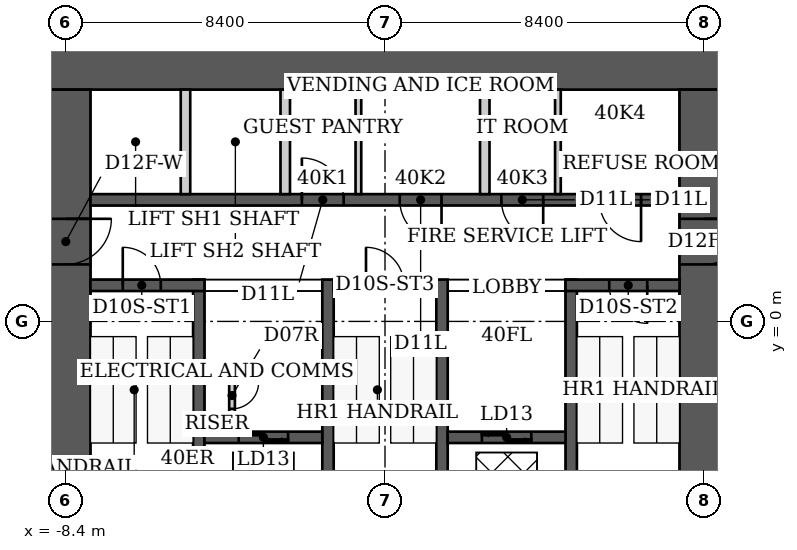
"""IFC4 building model, lengths in metres.
Left out: names, types, materials, properties, quantities, classifications, styles, units other than length and angle.
Written with IfcOpenShell. Run it as: python <this file> out.ifc"""

import sys

from ifc_helpers import new_model, si_unit, direction, frame, frame_2d, origin, place, context, subcontext, project, spatial, rectangle, extrude, element, fill, save


model = new_model("IFC4")
c1 = context("Model", 3, precision=1e-05, world=origin(), true_north=direction((0.0, 1.0)))
c2 = subcontext(c1, "Body", "Model", "MODEL_VIEW")
j1 = project(units=[si_unit("LENGTHUNIT", "METRE"), si_unit("PLANEANGLEUNIT", "RADIAN")], contexts=[c1])
p1 = place(None, origin())
s1 = spatial("IfcSite", under=j1, at=p1, CompositionType="ELEMENT")
p2 = place(p1, origin())
s2 = spatial("IfcBuilding", under=s1, at=p2, CompositionType="ELEMENT")
p3 = place(p2, frame((0.0, 0.0, 161.4)))
s3 = spatial("IfcBuildingStorey", under=s2, at=p3, CompositionType="ELEMENT", Elevation=161.4)
p4 = place(p3, frame((-9.05, 6.75, 0.0), z_axis=(0.0, 0.0, 1.0), x_axis=(1.0, 0.0, 0.0)))
e1 = element("IfcWall", 1, at=p4, inside=s3, PredefinedType="SHEAR", context=c2, shape_type="SweptSolid", body=[
    extrude(rectangle(XDim=18.1, YDim=1.3, at=frame_2d((9.05, 0.0))), origin(), (0.0, 0.0, 1.0), 3.8),
])
p5 = place(p3, frame((-8.4, -9.2, 0.0), z_axis=(0.0, 0.0, 1.0), x_axis=(0.0, 1.0, 0.0)))
e2 = element("IfcWall", 2, at=p5, inside=s3, PredefinedType="SHEAR", context=c2, shape_type="SweptSolid", body=[
    extrude(rectangle(XDim=15.3, YDim=1.3, at=frame_2d((7.65, 0.0))), origin(), (0.0, 0.0, 1.0), 3.8),
])
p6 = place(p5, frame((10.7, 0.0, 0.0)))
e3 = element("IfcOpeningElement", 3, at=p6, cuts=e2, PredefinedType="OPENING", context=c2, shape_type="SweptSolid", body=[
    extrude(rectangle(XDim=1.2, YDim=2.2, at=frame_2d((0.6, 1.1))), frame((0.0, 0.65, 0.0), z_axis=(0.0, -1.0, 0.0), x_axis=(1.0, 0.0, 0.0)), (0.0, 0.0, 1.0), 1.3),
])
p7 = place(p3, frame((8.4, -9.2, 0.0), z_axis=(0.0, 0.0, 1.0), x_axis=(0.0, 1.0, 0.0)))
e4 = element("IfcWall", 4, at=p7, inside=s3, PredefinedType="SHEAR", context=c2, shape_type="SweptSolid", body=[
    extrude(rectangle(XDim=15.3, YDim=1.3, at=frame_2d((7.65, 0.0))), origin(), (0.0, 0.0, 1.0), 3.8),
])
p8 = place(p7, frame((10.7, 0.0, 0.0)))
e5 = element("IfcOpeningElement", 5, at=p8, cuts=e4, PredefinedType="OPENING", context=c2, shape_type="SweptSolid", body=[
    extrude(rectangle(XDim=1.2, YDim=2.2, at=frame_2d((0.6, 1.1))), frame((0.0, 0.65, 0.0), z_axis=(0.0, -1.0, 0.0), x_axis=(1.0, 0.0, 0.0)), (0.0, 0.0, 1.0), 1.3),
])
for number, where, z_axis, x_axis in (
    (6, (-4.9, -6.1, 0.0), (0.0, 0.0, 1.0), (0.0, 1.0, 0.0)),
    (7, (-1.5, -6.1, 0.0), (0.0, 0.0, 1.0), (0.0, 1.0, 0.0)),
    (8, (1.5, -6.1, 0.0), (0.0, 0.0, 1.0), (0.0, 1.0, 0.0)),
    (9, (4.9, -6.1, 0.0), (0.0, 0.0, 1.0), (0.0, 1.0, 0.0)),
):
    element("IfcWall", number, at=place(p3, frame(where, z_axis=z_axis, x_axis=x_axis)), inside=s3, PredefinedType="SHEAR", context=c2, shape_type="SweptSolid", body=[
        extrude(rectangle(XDim=7.2, YDim=0.3, at=frame_2d((3.6, 0.0))), origin(), (0.0, 0.0, 1.0), 3.8),
    ])
p9 = place(p3, frame((-7.75, 0.95, 0.0), z_axis=(0.0, 0.0, 1.0), x_axis=(1.0, 0.0, 0.0)))
e10 = element("IfcWall", 10, at=p9, inside=s3, PredefinedType="SHEAR", context=c2, shape_type="SweptSolid", body=[
    extrude(rectangle(XDim=3.0, YDim=0.3, at=frame_2d((1.5, 0.0))), origin(), (0.0, 0.0, 1.0), 3.8),
])
p10 = place(p9, frame((0.85, 0.0, 0.0)))
e11 = element("IfcOpeningElement", 11, at=p10, cuts=e10, PredefinedType="OPENING", context=c2, shape_type="SweptSolid", body=[
    extrude(rectangle(XDim=1.0, YDim=2.2, at=frame_2d((0.5, 1.1))), frame((0.0, 0.15, 0.0), z_axis=(0.0, -1.0, 0.0), x_axis=(1.0, 0.0, 0.0)), (0.0, 0.0, 1.0), 0.3),
])
p11 = place(p3, frame((-1.35, 0.95, 0.0), z_axis=(0.0, 0.0, 1.0), x_axis=(1.0, 0.0, 0.0)))
e12 = element("IfcWall", 12, at=p11, inside=s3, PredefinedType="SHEAR", context=c2, shape_type="SweptSolid", body=[
    extrude(rectangle(XDim=2.7, YDim=0.3, at=frame_2d((1.35, 0.0))), origin(), (0.0, 0.0, 1.0), 3.8),
])
p12 = place(p11, frame((0.85, 0.0, 0.0)))
e13 = element("IfcOpeningElement", 13, at=p12, cuts=e12, PredefinedType="OPENING", context=c2, shape_type="SweptSolid", body=[
    extrude(rectangle(XDim=1.0, YDim=2.2, at=frame_2d((0.5, 1.1))), frame((0.0, 0.15, 0.0), z_axis=(0.0, -1.0, 0.0), x_axis=(1.0, 0.0, 0.0)), (0.0, 0.0, 1.0), 0.3),
])
p13 = place(p3, frame((4.75, 0.95, 0.0), z_axis=(0.0, 0.0, 1.0), x_axis=(1.0, 0.0, 0.0)))
e14 = element("IfcWall", 14, at=p13, inside=s3, PredefinedType="SHEAR", context=c2, shape_type="SweptSolid", body=[
    extrude(rectangle(XDim=3.0, YDim=0.3, at=frame_2d((1.5, 0.0))), origin(), (0.0, 0.0, 1.0), 3.8),
])
p14 = place(p13, frame((1.15, 0.0, 0.0)))
e15 = element("IfcOpeningElement", 15, at=p14, cuts=e14, PredefinedType="OPENING", context=c2, shape_type="SweptSolid", body=[
    extrude(rectangle(XDim=1.0, YDim=2.2, at=frame_2d((0.5, 1.1))), frame((0.0, 0.15, 0.0), z_axis=(0.0, -1.0, 0.0), x_axis=(1.0, 0.0, 0.0)), (0.0, 0.0, 1.0), 0.3),
])
p15 = place(p3, frame((-4.75, -3.05, 0.0), z_axis=(0.0, 0.0, 1.0), x_axis=(1.0, 0.0, 0.0)))
e16 = element("IfcWall", 16, at=p15, inside=s3, PredefinedType="SHEAR", context=c2, shape_type="SweptSolid", body=[
    extrude(rectangle(XDim=3.1, YDim=0.3, at=frame_2d((1.55, 0.0))), origin(), (0.0, 0.0, 1.0), 3.8),
])
p16 = place(p15, frame((0.9, 0.0, 0.0)))
e17 = element("IfcOpeningElement", 17, at=p16, cuts=e16, PredefinedType="OPENING", context=c2, shape_type="SweptSolid", body=[
    extrude(rectangle(XDim=1.3, YDim=2.1, at=frame_2d((0.65, 1.05))), frame((0.0, 0.15, 0.0), z_axis=(0.0, -1.0, 0.0), x_axis=(1.0, 0.0, 0.0)), (0.0, 0.0, 1.0), 0.3),
])
p17 = place(p3, frame((1.65, -3.05, 0.0), z_axis=(0.0, 0.0, 1.0), x_axis=(1.0, 0.0, 0.0)))
e18 = element("IfcWall", 18, at=p17, inside=s3, PredefinedType="SHEAR", context=c2, shape_type="SweptSolid", body=[
    extrude(rectangle(XDim=3.1, YDim=0.3, at=frame_2d((1.55, 0.0))), origin(), (0.0, 0.0, 1.0), 3.8),
])
p18 = place(p17, frame((0.9, 0.0, 0.0)))
e19 = element("IfcOpeningElement", 19, at=p18, cuts=e18, PredefinedType="OPENING", context=c2, shape_type="SweptSolid", body=[
    extrude(rectangle(XDim=1.3, YDim=2.1, at=frame_2d((0.65, 1.05))), frame((0.0, 0.15, 0.0), z_axis=(0.0, -1.0, 0.0), x_axis=(1.0, 0.0, 0.0)), (0.0, 0.0, 1.0), 0.3),
])
p19 = place(p3, frame((-7.75, 3.2, 0.0), z_axis=(0.0, 0.0, 1.0), x_axis=(1.0, 0.0, 0.0)))
e20 = element("IfcWall", 20, at=p19, inside=s3, PredefinedType="SHEAR", context=c2, shape_type="SweptSolid", body=[
    extrude(rectangle(XDim=15.5, YDim=0.3, at=frame_2d((7.75, 0.0))), origin(), (0.0, 0.0, 1.0), 3.8),
])
p20 = place(p19, frame((5.562, 0.0, 0.0)))
e21 = element("IfcOpeningElement", 21, at=p20, cuts=e20, PredefinedType="OPENING", context=c2, shape_type="SweptSolid", body=[
    extrude(rectangle(XDim=1.1, YDim=2.2, at=frame_2d((0.55, 1.1))), frame((0.0, 0.15, 0.0), z_axis=(0.0, -1.0, 0.0), x_axis=(1.0, 0.0, 0.0)), (0.0, 0.0, 1.0), 0.3),
])
p21 = place(p19, frame((8.137, 0.0, 0.0)))
e22 = element("IfcOpeningElement", 22, at=p21, cuts=e20, PredefinedType="OPENING", context=c2, shape_type="SweptSolid", body=[
    extrude(rectangle(XDim=1.1, YDim=2.2, at=frame_2d((0.55, 1.1))), frame((0.0, 0.15, 0.0), z_axis=(0.0, -1.0, 0.0), x_axis=(1.0, 0.0, 0.0)), (0.0, 0.0, 1.0), 0.3),
])
p22 = place(p19, frame((10.812, 0.0, 0.0)))
e23 = element("IfcOpeningElement", 23, at=p22, cuts=e20, PredefinedType="OPENING", context=c2, shape_type="SweptSolid", body=[
    extrude(rectangle(XDim=1.1, YDim=2.2, at=frame_2d((0.55, 1.1))), frame((0.0, 0.15, 0.0), z_axis=(0.0, -1.0, 0.0), x_axis=(1.0, 0.0, 0.0)), (0.0, 0.0, 1.0), 0.3),
])
p23 = place(p19, frame((13.387, 0.0, 0.0)))
e24 = element("IfcOpeningElement", 24, at=p23, cuts=e20, PredefinedType="OPENING", context=c2, shape_type="SweptSolid", body=[
    extrude(rectangle(XDim=1.1, YDim=2.2, at=frame_2d((0.55, 1.1))), frame((0.0, 0.15, 0.0), z_axis=(0.0, -1.0, 0.0), x_axis=(1.0, 0.0, 0.0)), (0.0, 0.0, 1.0), 0.3),
])
for number, where, z_axis, x_axis in (
    (25, (-5.25, 3.35, 0.0), (0.0, 0.0, 1.0), (0.0, 1.0, 0.0)),
    (26, (-2.625, 3.35, 0.0), (0.0, 0.0, 1.0), (0.0, 1.0, 0.0)),
    (27, (2.625, 3.35, 0.0), (0.0, 0.0, 1.0), (0.0, 1.0, 0.0)),
):
    element("IfcWall", number, at=place(p3, frame(where, z_axis=z_axis, x_axis=x_axis)), inside=s3, PredefinedType="PARTITIONING", context=c2, shape_type="SweptSolid", body=[
        extrude(rectangle(XDim=2.75, YDim=0.25, at=frame_2d((1.375, 0.0))), origin(), (0.0, 0.0, 1.0), 3.8),
    ])
p24 = place(p3, frame((-4.025, -2.9, 0.0), z_axis=(0.0, 0.0, 1.0), x_axis=(0.0, 1.0, 0.0)))
e28 = element("IfcWall", 28, at=p24, inside=s3, PredefinedType="PARTITIONING", context=c2, shape_type="SweptSolid", body=[
    extrude(rectangle(XDim=1.775, YDim=0.15, at=frame_2d((0.887, 0.0))), origin(), (0.0, 0.0, 1.0), 3.64),
])
p25 = place(p24, frame((0.6, 0.0, 0.0)))
e29 = element("IfcOpeningElement", 29, at=p25, cuts=e28, PredefinedType="OPENING", context=c2, shape_type="SweptSolid", body=[
    extrude(rectangle(XDim=0.7, YDim=2.1, at=frame_2d((0.35, 1.05))), frame((0.0, 0.075, 0.0), z_axis=(0.0, -1.0, 0.0), x_axis=(1.0, 0.0, 0.0)), (0.0, 0.0, 1.0), 0.15),
])
p26 = place(p3, frame((-4.75, -1.2, 0.0), z_axis=(0.0, 0.0, 1.0), x_axis=(1.0, 0.0, 0.0)))
e30 = element("IfcWall", 30, at=p26, inside=s3, PredefinedType="PARTITIONING", context=c2, shape_type="SweptSolid", body=[
    extrude(rectangle(XDim=0.8, YDim=0.15, at=frame_2d((0.4, 0.0))), origin(), (0.0, 0.0, 1.0), 3.64),
])
for number, where, z_axis, x_axis in (
    (31, (-0.7, 3.35, 0.0), (0.0, 0.0, 1.0), (0.0, 1.0, 0.0)),
    (32, (4.55, 3.35, 0.0), (0.0, 0.0, 1.0), (0.0, 1.0, 0.0)),
):
    element("IfcWall", number, at=place(p3, frame(where, z_axis=z_axis, x_axis=x_axis)), inside=s3, PredefinedType="PARTITIONING", context=c2, shape_type="SweptSolid", body=[
        extrude(rectangle(XDim=2.75, YDim=0.15, at=frame_2d((1.375, 0.0))), origin(), (0.0, 0.0, 1.0), 3.64),
    ])
p27 = place(p10, origin())
e33 = element("IfcDoor", 33, at=p27, inside=s3, OperationType="SINGLE_SWING_LEFT", PredefinedType="DOOR", context=c2, shape_type="SweptSolid", body=[
    extrude(rectangle(XDim=1.0, YDim=2.2, at=frame_2d((0.5, 1.1))), frame((0.0, 0.025, 0.0), z_axis=(0.0, -1.0, 0.0), x_axis=(1.0, 0.0, 0.0)), (0.0, 0.0, 1.0), 0.05),
])
fill(e11, e33)
p28 = place(p12, origin())
e34 = element("IfcDoor", 34, at=p28, inside=s3, OperationType="SINGLE_SWING_LEFT", PredefinedType="DOOR", context=c2, shape_type="SweptSolid", body=[
    extrude(rectangle(XDim=1.0, YDim=2.2, at=frame_2d((0.5, 1.1))), frame((0.0, 0.025, 0.0), z_axis=(0.0, -1.0, 0.0), x_axis=(1.0, 0.0, 0.0)), (0.0, 0.0, 1.0), 0.05),
])
fill(e13, e34)
p29 = place(p14, origin())
e35 = element("IfcDoor", 35, at=p29, inside=s3, OperationType="SINGLE_SWING_RIGHT", PredefinedType="DOOR", context=c2, shape_type="SweptSolid", body=[
    extrude(rectangle(XDim=1.0, YDim=2.2, at=frame_2d((0.5, 1.1))), frame((0.0, 0.025, 0.0), z_axis=(0.0, -1.0, 0.0), x_axis=(1.0, 0.0, 0.0)), (0.0, 0.0, 1.0), 0.05),
])
fill(e15, e35)
p30 = place(p6, origin())
e36 = element("IfcDoor", 36, at=p30, inside=s3, OperationType="SINGLE_SWING_RIGHT", PredefinedType="DOOR", context=c2, shape_type="SweptSolid", body=[
    extrude(rectangle(XDim=1.2, YDim=2.2, at=frame_2d((0.6, 1.1))), frame((0.0, 0.025, 0.0), z_axis=(0.0, -1.0, 0.0), x_axis=(1.0, 0.0, 0.0)), (0.0, 0.0, 1.0), 0.05),
])
fill(e3, e36)
p31 = place(p8, origin())
e37 = element("IfcDoor", 37, at=p31, inside=s3, OperationType="SINGLE_SWING_RIGHT", PredefinedType="DOOR", context=c2, shape_type="SweptSolid", body=[
    extrude(rectangle(XDim=1.2, YDim=2.2, at=frame_2d((0.6, 1.1))), frame((0.0, 0.025, 0.0), z_axis=(0.0, -1.0, 0.0), x_axis=(1.0, 0.0, 0.0)), (0.0, 0.0, 1.0), 0.05),
])
fill(e5, e37)
p32 = place(p25, origin())
e38 = element("IfcDoor", 38, at=p32, inside=s3, OperationType="SINGLE_SWING_RIGHT", PredefinedType="DOOR", context=c2, shape_type="SweptSolid", body=[
    extrude(rectangle(XDim=0.7, YDim=2.1, at=frame_2d((0.35, 1.05))), frame((0.0, 0.025, 0.0), z_axis=(0.0, -1.0, 0.0), x_axis=(1.0, 0.0, 0.0)), (0.0, 0.0, 1.0), 0.05),
])
fill(e29, e38)
p33 = place(p20, origin())
e39 = element("IfcDoor", 39, at=p33, inside=s3, OperationType="SINGLE_SWING_LEFT", PredefinedType="DOOR", context=c2, shape_type="SweptSolid", body=[
    extrude(rectangle(XDim=1.1, YDim=2.2, at=frame_2d((0.55, 1.1))), frame((0.0, 0.025, 0.0), z_axis=(0.0, -1.0, 0.0), x_axis=(1.0, 0.0, 0.0)), (0.0, 0.0, 1.0), 0.05),
])
fill(e21, e39)
p34 = place(p21, origin())
e40 = element("IfcDoor", 40, at=p34, inside=s3, OperationType="SINGLE_SWING_RIGHT", PredefinedType="DOOR", context=c2, shape_type="SweptSolid", body=[
    extrude(rectangle(XDim=1.1, YDim=2.2, at=frame_2d((0.55, 1.1))), frame((0.0, 0.025, 0.0), z_axis=(0.0, -1.0, 0.0), x_axis=(1.0, 0.0, 0.0)), (0.0, 0.0, 1.0), 0.05),
])
fill(e22, e40)
p35 = place(p22, origin())
e41 = element("IfcDoor", 41, at=p35, inside=s3, OperationType="SINGLE_SWING_RIGHT", PredefinedType="DOOR", context=c2, shape_type="SweptSolid", body=[
    extrude(rectangle(XDim=1.1, YDim=2.2, at=frame_2d((0.55, 1.1))), frame((0.0, 0.025, 0.0), z_axis=(0.0, -1.0, 0.0), x_axis=(1.0, 0.0, 0.0)), (0.0, 0.0, 1.0), 0.05),
])
fill(e23, e41)
p36 = place(p23, origin())
e42 = element("IfcDoor", 42, at=p36, inside=s3, OperationType="SINGLE_SWING_RIGHT", PredefinedType="DOOR", context=c2, shape_type="SweptSolid", body=[
    extrude(rectangle(XDim=1.1, YDim=2.2, at=frame_2d((0.55, 1.1))), frame((0.0, 0.025, 0.0), z_axis=(0.0, -1.0, 0.0), x_axis=(1.0, 0.0, 0.0)), (0.0, 0.0, 1.0), 0.05),
])
fill(e24, e42)
p37 = place(p16, origin())
e43 = element("IfcDoor", 43, at=p37, inside=s3, OperationType="DOUBLE_DOOR_SLIDING", PredefinedType="DOOR", context=c2, shape_type="SweptSolid", body=[
    extrude(rectangle(XDim=1.3, YDim=2.1, at=frame_2d((0.65, 1.05))), frame((0.0, 0.025, 0.0), z_axis=(0.0, -1.0, 0.0), x_axis=(1.0, 0.0, 0.0)), (0.0, 0.0, 1.0), 0.05),
])
fill(e17, e43)
p38 = place(p18, origin())
e44 = element("IfcDoor", 44, at=p38, inside=s3, OperationType="DOUBLE_DOOR_SLIDING", PredefinedType="DOOR", context=c2, shape_type="SweptSolid", body=[
    extrude(rectangle(XDim=1.3, YDim=2.1, at=frame_2d((0.65, 1.05))), frame((0.0, 0.025, 0.0), z_axis=(0.0, -1.0, 0.0), x_axis=(1.0, 0.0, 0.0)), (0.0, 0.0, 1.0), 0.05),
])
fill(e19, e44)
save(model, sys.argv[1])
